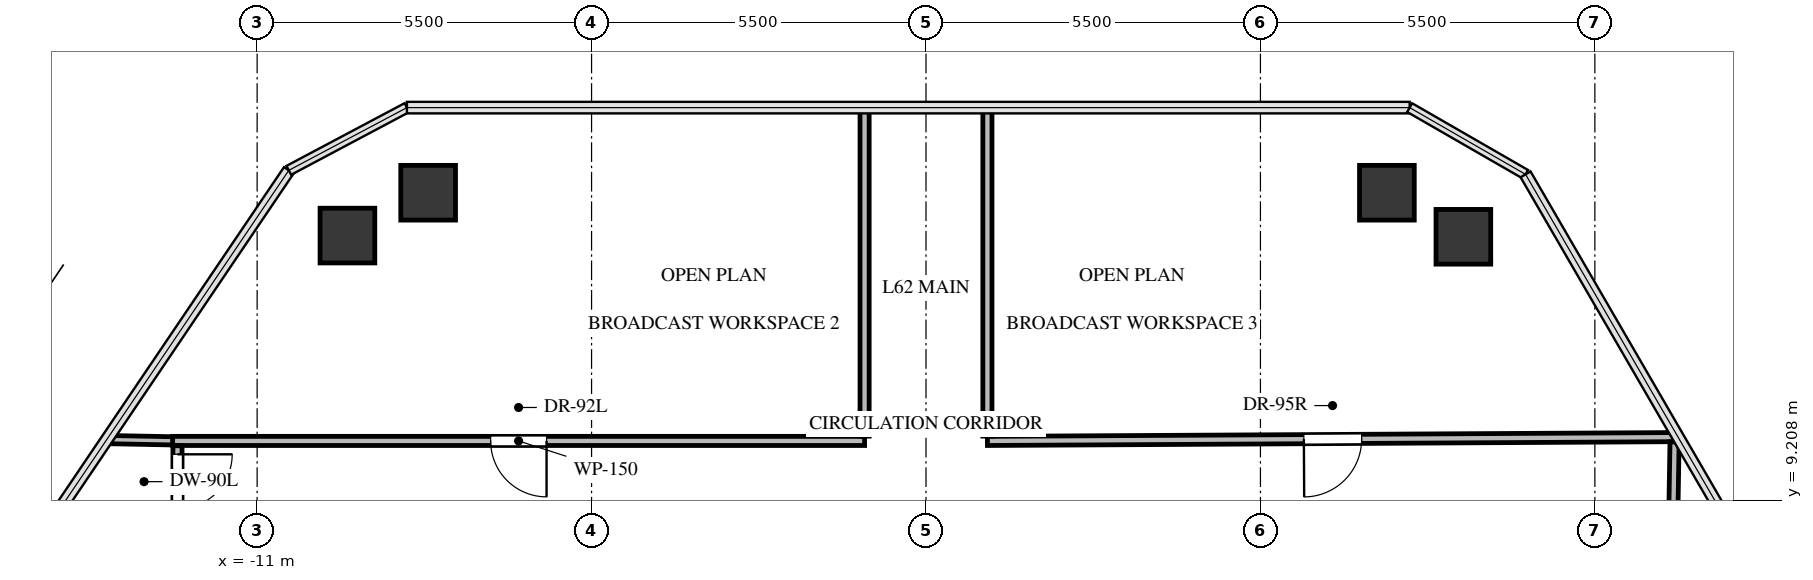
"""IFC4 building model, lengths in metres.
Left out: names, types, materials, properties, quantities, classifications, styles, units other than length and angle.
Written with IfcOpenShell. Run it as: python <this file> out.ifc"""

import sys

from ifc_helpers import new_model, si_unit, direction, frame, frame_2d, origin, origin_2d, place, context, subcontext, project, spatial, rectangle, extrude, source, transform, mapped, element, fill, save


model = new_model("IFC4")
c1 = context("Model", 3, precision=1e-05, world=origin(), true_north=direction((0.0, 1.0)))
c2 = subcontext(c1, "Body", "Model", "MODEL_VIEW")
j1 = project(units=[si_unit("LENGTHUNIT", "METRE"), si_unit("PLANEANGLEUNIT", "RADIAN")], contexts=[c1])
p1 = place(None, origin())
s1 = spatial("IfcSite", under=j1, at=p1, CompositionType="ELEMENT")
p2 = place(p1, origin())
s2 = spatial("IfcBuilding", under=s1, at=p2, CompositionType="ELEMENT")
p3 = place(p2, frame((0.0, 0.0, 224.9)))
s3 = spatial("IfcBuildingStorey", under=s2, at=p3, CompositionType="ELEMENT", Elevation=224.9)
m1 = source(origin(), c2, "Body", "SweptSolid", [
    extrude(rectangle(XDim=0.9, YDim=0.9, at=origin_2d()), origin(), (0.0, 0.0, 1.0), 3.3),
])
for number, where, z_axis, x_axis in (
    (1, (-9.515, 13.557, -0.24), (0.0, 0.0, 1.0), (1.0, 0.0, 0.0)),
    (2, (-8.188, 14.262, -0.24), (0.0, 0.0, 1.0), (1.0, 0.0, 0.0)),
    (3, (7.58, 14.262, -0.24), (0.0, 0.0, 1.0), (1.0, 0.0, 0.0)),
    (4, (8.837, 13.538, -0.24), (0.0, 0.0, 1.0), (1.0, 0.0, 0.0)),
):
    element("IfcColumn", number, at=place(p3, frame(where, z_axis=z_axis, x_axis=x_axis)), inside=s3, PredefinedType="COLUMN", context=c2, shape_type="MappedRepresentation", body=[
        mapped(m1, transform((0.0, 0.0, 0.0), x_axis=(1.0, 0.0, 0.0), y_axis=(0.0, 1.0, 0.0), z_axis=(0.0, 0.0, 1.0), scale=1.0)),
    ])
p4 = place(p3, frame((-1.01, 10.18, 0.0), z_axis=(0.0, 0.0, 1.0), x_axis=(-1.0, 0.0, 0.0)))
e5 = element("IfcWall", 5, at=p4, inside=s3, PredefinedType="PARTITIONING", context=c2, shape_type="SweptSolid", body=[
    extrude(rectangle(XDim=11.38, YDim=0.15, at=frame_2d((5.69, 0.0))), origin(), (0.0, 0.0, 1.0), 2.302),
])
p5 = place(p4, frame((5.23, 0.0, 0.0)))
e6 = element("IfcOpeningElement", 6, at=p5, cuts=e5, PredefinedType="OPENING", context=c2, shape_type="SweptSolid", body=[
    extrude(rectangle(XDim=0.92, YDim=2.1, at=frame_2d((0.46, 1.05))), frame((0.0, 0.085, 0.0), z_axis=(0.0, -1.0, 0.0), x_axis=(1.0, 0.0, 0.0)), (0.0, 0.0, 1.0), 0.17),
])
p6 = place(p3, frame((-1.01, 15.662, 0.0), z_axis=(0.0, 0.0, 1.0), x_axis=(0.0, -1.0, 0.0)))
e7 = element("IfcWall", 7, at=p6, inside=s3, PredefinedType="PARTITIONING", context=c2, shape_type="SweptSolid", body=[
    extrude(rectangle(XDim=5.403, YDim=0.15, at=frame_2d((2.702, 0.0))), origin(), (0.0, 0.0, 1.0), 2.399),
])
p7 = place(p3, frame((12.368, 10.243, 0.0), z_axis=(0.0, 0.0, 1.0), x_axis=(-0.999984623931, -0.005545439622, 0.0)))
e8 = element("IfcWall", 8, at=p7, inside=s3, PredefinedType="PARTITIONING", context=c2, shape_type="SweptSolid", body=[
    extrude(rectangle(XDim=11.359, YDim=0.15, at=frame_2d((5.679, 0.0))), origin(), (0.0, 0.0, 1.0), 2.302),
])
p8 = place(p7, frame((5.204, 0.0, 0.0)))
e9 = element("IfcOpeningElement", 9, at=p8, cuts=e8, PredefinedType="OPENING", context=c2, shape_type="SweptSolid", body=[
    extrude(rectangle(XDim=0.95, YDim=2.1, at=frame_2d((0.475, 1.05))), frame((0.0, 0.085, 0.0), z_axis=(0.0, -1.0, 0.0), x_axis=(1.0, 0.0, 0.0)), (0.0, 0.0, 1.0), 0.17),
])
p9 = place(p3, frame((1.01, 10.259, 0.0), z_axis=(0.0, 0.0, 1.0), x_axis=(0.0, 1.0, 0.0)))
e10 = element("IfcWall", 10, at=p9, inside=s3, PredefinedType="PARTITIONING", context=c2, shape_type="SweptSolid", body=[
    extrude(rectangle(XDim=5.403, YDim=0.15, at=frame_2d((2.702, 0.0))), origin(), (0.0, 0.0, 1.0), 2.399),
])
p10 = place(p3, frame((-12.31, 10.101, 0.0), z_axis=(0.0, 0.0, 1.0), x_axis=(0.0, -1.0, 0.0)))
e11 = element("IfcWall", 11, at=p10, inside=s3, PredefinedType="PARTITIONING", context=c2, shape_type="SweptSolid", body=[
    extrude(rectangle(XDim=1.182, YDim=0.15, at=frame_2d((0.591, 0.0))), origin(), (0.0, 0.0, 1.0), 2.399),
])
p11 = place(p10, frame((0.141, 0.0, 0.0)))
e12 = element("IfcOpeningElement", 12, at=p11, cuts=e11, PredefinedType="OPENING", context=c2, shape_type="SweptSolid", body=[
    extrude(rectangle(XDim=0.9, YDim=2.05, at=frame_2d((0.45, 1.025))), frame((0.0, 0.085, 0.0), z_axis=(0.0, -1.0, 0.0), x_axis=(1.0, 0.0, 0.0)), (0.0, 0.0, 1.0), 0.17),
])
p12 = place(p3, frame((12.181, 2.49, 0.0), z_axis=(0.0, 0.0, 1.0), x_axis=(0.016828134389, 0.999858396921, 0.0)))
e13 = element("IfcWall", 13, at=p12, inside=s3, PredefinedType="PARTITIONING", context=c2, shape_type="SweptSolid", body=[
    extrude(rectangle(XDim=7.675, YDim=0.15, at=frame_2d((3.837, 0.0))), origin(), (0.0, 0.0, 1.0), 2.399),
])
p13 = place(p12, frame((3.362, 0.0, 0.0)))
e14 = element("IfcOpeningElement", 14, at=p13, cuts=e13, PredefinedType="OPENING", context=c2, shape_type="SweptSolid", body=[
    extrude(rectangle(XDim=0.95, YDim=2.1, at=frame_2d((0.475, 1.05))), frame((0.0, 0.085, 0.0), z_axis=(0.0, -1.0, 0.0), x_axis=(1.0, 0.0, 0.0)), (0.0, 0.0, 1.0), 0.17),
])
p14 = place(p3, frame((-12.39, 10.181, 0.0), z_axis=(0.0, 0.0, 1.0), x_axis=(-0.999812128272, 0.019383192748, 0.0)))
e15 = element("IfcWall", 15, at=p14, inside=s3, PredefinedType="PARTITIONING", context=c2, shape_type="SweptSolid", body=[
    extrude(rectangle(XDim=1.083, YDim=0.135, at=frame_2d((0.542, 0.0))), origin(), (0.0, 0.0, 1.0), 3.045),
])
m2 = source(origin(), c2, "Body", "SweptSolid", [
    extrude(rectangle(XDim=0.92, YDim=2.1, at=frame_2d((0.46, 1.05))), frame((0.0, 0.025, 0.0), z_axis=(0.0, -1.0, 0.0), x_axis=(1.0, 0.0, 0.0)), (0.0, 0.0, 1.0), 0.05),
])
p15 = place(p5, origin())
e16 = element("IfcDoor", 16, at=p15, inside=s3, OperationType="SINGLE_SWING_LEFT", PredefinedType="DOOR", context=c2, shape_type="MappedRepresentation", body=[
    mapped(m2, transform((0.0, 0.0, 0.0), x_axis=(1.0, 0.0, 0.0), y_axis=(0.0, 1.0, 0.0), z_axis=(0.0, 0.0, 1.0), scale=1.0)),
])
fill(e6, e16)
m3 = source(origin(), c2, "Body", "SweptSolid", [
    extrude(rectangle(XDim=0.95, YDim=2.1, at=frame_2d((0.475, 1.05))), frame((0.0, 0.025, 0.0), z_axis=(0.0, -1.0, 0.0), x_axis=(1.0, 0.0, 0.0)), (0.0, 0.0, 1.0), 0.05),
])
p16 = place(p8, origin())
e17 = element("IfcDoor", 17, at=p16, inside=s3, OperationType="SINGLE_SWING_RIGHT", PredefinedType="DOOR", context=c2, shape_type="MappedRepresentation", body=[
    mapped(m3, transform((0.0, 0.0, 0.0), x_axis=(1.0, 0.0, 0.0), y_axis=(0.0, 1.0, 0.0), z_axis=(0.0, 0.0, 1.0), scale=1.0)),
])
fill(e9, e17)
m4 = source(origin(), c2, "Body", "SweptSolid", [
    extrude(rectangle(XDim=0.9, YDim=2.05, at=frame_2d((0.45, 1.025))), frame((0.0, 0.025, 0.0), z_axis=(0.0, -1.0, 0.0), x_axis=(1.0, 0.0, 0.0)), (0.0, 0.0, 1.0), 0.05),
])
p17 = place(p11, origin())
e18 = element("IfcDoor", 18, at=p17, inside=s3, OperationType="SINGLE_SWING_LEFT", PredefinedType="DOOR", context=c2, shape_type="MappedRepresentation", body=[
    mapped(m4, transform((0.0, 0.0, 0.0), x_axis=(1.0, 0.0, 0.0), y_axis=(0.0, 1.0, 0.0), z_axis=(0.0, 0.0, 1.0), scale=1.0)),
])
fill(e12, e18)
save(model, sys.argv[1])
